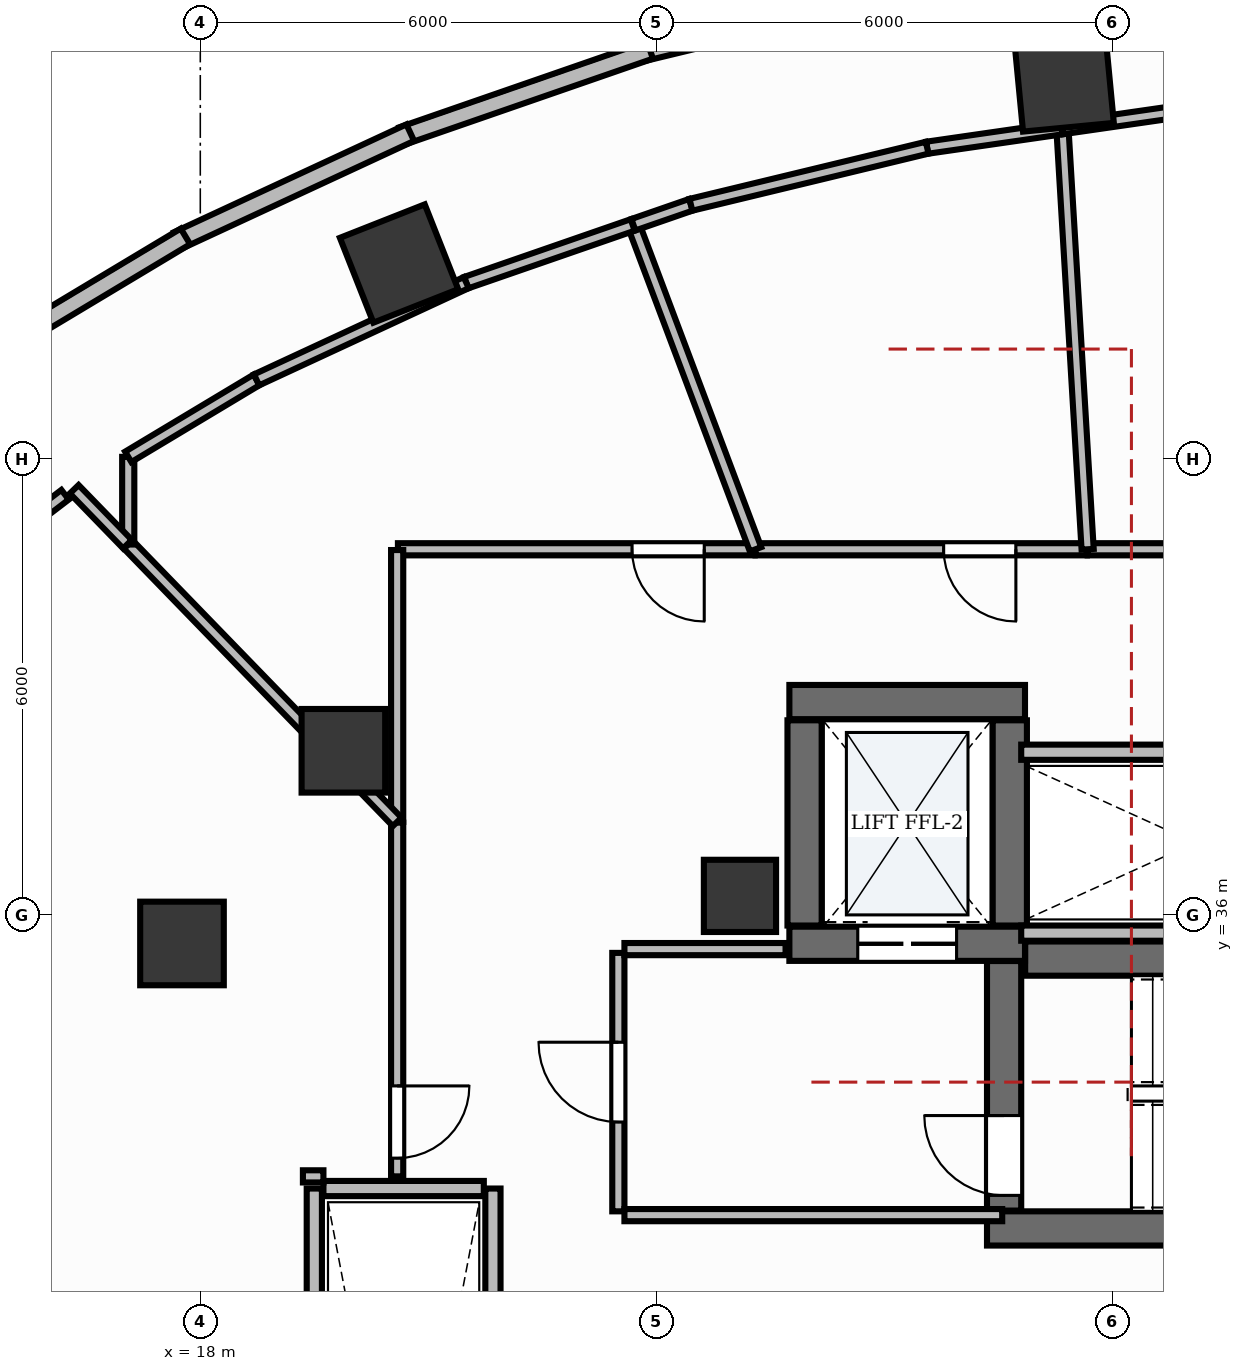
"""IFC4 building model, lengths in metres.
Left out: names, types, materials, properties, quantities, classifications, styles, units other than length and angle.
Written with IfcOpenShell. Run it as: python <this file> out.ifc"""

import sys

from ifc_helpers import new_model, si_unit, direction, frame, frame_2d, origin, origin_2d, place, context, subcontext, project, spatial, rectangle, extrude, element, fill, save


model = new_model("IFC4")
c1 = context("Model", 3, precision=1e-05, world=origin(), true_north=direction((0.0, 1.0)))
c2 = subcontext(c1, "Body", "Model", "MODEL_VIEW")
j1 = project(units=[si_unit("LENGTHUNIT", "METRE"), si_unit("PLANEANGLEUNIT", "RADIAN")], contexts=[c1])
p1 = place(None, origin())
s1 = spatial("IfcSite", under=j1, at=p1, CompositionType="ELEMENT")
p2 = place(p1, origin())
s2 = spatial("IfcBuilding", under=s1, at=p2, CompositionType="ELEMENT")
p3 = place(p2, frame((0.0, 0.0, 84.6)))
s3 = spatial("IfcBuildingStorey", under=s2, at=p3, CompositionType="ELEMENT", Elevation=84.6)
p4 = place(p3, frame((28.852, 35.425, 0.0), z_axis=(0.0, 0.0, 1.0), x_axis=(1.0, 0.0, 0.0)))
e1 = element("IfcWall", 1, at=p4, inside=s3, PredefinedType="SHEAR", context=c2, shape_type="SweptSolid", body=[
    extrude(rectangle(XDim=8.248, YDim=0.45, at=frame_2d((4.124, 0.0))), origin(), (0.0, 0.0, 1.0), 5.1),
])
p5 = place(p3, frame((28.35, 31.875, 0.0), z_axis=(0.0, 0.0, 1.0), x_axis=(1.0, 0.0, 0.0)))
e2 = element("IfcWall", 2, at=p5, inside=s3, PredefinedType="SHEAR", context=c2, shape_type="SweptSolid", body=[
    extrude(rectangle(XDim=8.75, YDim=0.45, at=frame_2d((4.375, 0.0))), origin(), (0.0, 0.0, 1.0), 5.1),
])
p6 = place(p3, frame((28.575, 32.11, 0.0), z_axis=(0.0, 0.0, 1.0), x_axis=(0.0, 1.0, 0.0)))
e3 = element("IfcWall", 3, at=p6, inside=s3, PredefinedType="SHEAR", context=c2, shape_type="SweptSolid", body=[
    extrude(rectangle(XDim=3.283, YDim=0.45, at=frame_2d((1.642, 0.0))), origin(), (0.0, 0.0, 1.0), 5.1),
])
p7 = place(p6, frame((0.2, 0.0, 0.0)))
e4 = element("IfcOpeningElement", 4, at=p7, cuts=e3, PredefinedType="OPENING", context=c2, shape_type="SweptSolid", body=[
    extrude(rectangle(XDim=1.05, YDim=2.15, at=frame_2d((0.525, 1.075))), frame((0.0, 0.24, 0.0), z_axis=(0.0, -1.0, 0.0), x_axis=(1.0, 0.0, 0.0)), (0.0, 0.0, 1.0), 0.48),
])
p8 = place(p3, frame((25.75, 38.8, 0.0), z_axis=(0.0, 0.0, 1.0), x_axis=(1.0, 0.0, 0.0)))
e5 = element("IfcWall", 5, at=p8, inside=s3, PredefinedType="SHEAR", context=c2, shape_type="SweptSolid", body=[
    extrude(rectangle(XDim=3.1, YDim=0.45, at=frame_2d((1.55, 0.0))), origin(), (0.0, 0.0, 1.0), 5.1),
])
p9 = place(p3, frame((25.75, 35.62, 0.0), z_axis=(0.0, 0.0, 1.0), x_axis=(1.0, 0.0, 0.0)))
e6 = element("IfcWall", 6, at=p9, inside=s3, PredefinedType="SHEAR", context=c2, shape_type="SweptSolid", body=[
    extrude(rectangle(XDim=3.1, YDim=0.45, at=frame_2d((1.55, 0.0))), origin(), (0.0, 0.0, 1.0), 5.1),
])
p10 = place(p9, frame((0.9, 0.0, 0.0)))
e7 = element("IfcOpeningElement", 7, at=p10, cuts=e6, PredefinedType="OPENING", context=c2, shape_type="SweptSolid", body=[
    extrude(rectangle(XDim=1.3, YDim=2.2, at=frame_2d((0.65, 1.1))), frame((0.0, 0.24, 0.0), z_axis=(0.0, -1.0, 0.0), x_axis=(1.0, 0.0, 0.0)), (0.0, 0.0, 1.0), 0.48),
])
for number, where, z_axis, x_axis in (
    (8, (25.95, 35.86, 0.0), (0.0, 0.0, 1.0), (0.0, 1.0, 0.0)),
    (9, (28.65, 35.86, 0.0), (0.0, 0.0, 1.0), (0.0, 1.0, 0.0)),
):
    element("IfcWall", number, at=place(p3, frame(where, z_axis=z_axis, x_axis=x_axis)), inside=s3, PredefinedType="SHEAR", context=c2, shape_type="SweptSolid", body=[
        extrude(rectangle(XDim=2.7, YDim=0.45, at=frame_2d((1.35, 0.0))), origin(), (0.0, 0.0, 1.0), 5.1),
    ])
p11 = place(p3, frame((25.1, 36.25, -0.0), z_axis=(0.0, 0.0, 1.0), x_axis=(1.0, 0.0, 0.0)))
e10 = element("IfcColumn", 10, at=p11, inside=s3, PredefinedType="PILASTER", context=c2, shape_type="SweptSolid", body=[
    extrude(rectangle(XDim=0.95, YDim=0.95, at=origin_2d()), origin(), (0.0, 0.0, 1.0), 5.101),
])
for number, where, z_axis, x_axis in (
    (11, (29.364, 46.959, -0.0), (0.0, 0.0, 1.0), (0.995, 0.095, 0.0)),
    (12, (20.615, 44.569, -0.0), (0.0, 0.0, 1.0), (0.93, 0.367, 0.0)),
):
    element("IfcColumn", number, at=place(p3, frame(where, z_axis=z_axis, x_axis=x_axis)), inside=s3, PredefinedType="COLUMN", context=c2, shape_type="SweptSolid", body=[
        extrude(rectangle(XDim=1.2, YDim=1.2, at=origin_2d()), origin(), (0.0, 0.0, 1.0), 5.101),
    ])
for number, where, z_axis, x_axis in (
    (13, (19.883, 38.159, -0.0), (0.0, 0.0, 1.0), (1.0, 0.0, 0.0)),
    (14, (17.759, 35.624, -0.0), (0.0, 0.0, 1.0), (1.0, 0.0, 0.0)),
):
    element("IfcColumn", number, at=place(p3, frame(where, z_axis=z_axis, x_axis=x_axis)), inside=s3, PredefinedType="COLUMN", context=c2, shape_type="SweptSolid", body=[
        extrude(rectangle(XDim=1.1, YDim=1.1, at=origin_2d()), origin(), (0.0, 0.0, 1.0), 5.101),
    ])
p12 = place(p3, frame((27.219, 48.17, 0.0), z_axis=(0.0, 0.0, 1.0), x_axis=(-0.972031834852, -0.23484912611, 0.0)))
e15 = element("IfcWall", 15, at=p12, inside=s3, PredefinedType="STANDARD", context=c2, shape_type="SweptSolid", body=[
    extrude(rectangle(XDim=3.509, YDim=0.24, at=frame_2d((1.754, 0.0))), origin(), (0.0, 0.0, 1.0), 5.1),
])
p13 = place(p3, frame((23.916, 47.378, 0.0), z_axis=(0.0, 0.0, 1.0), x_axis=(-0.944863079672, -0.327465663349, 0.0)))
e16 = element("IfcWall", 16, at=p13, inside=s3, PredefinedType="STANDARD", context=c2, shape_type="SweptSolid", body=[
    extrude(rectangle(XDim=3.448, YDim=0.24, at=frame_2d((1.724, 0.0))), origin(), (0.0, 0.0, 1.0), 5.1),
])
p14 = place(p3, frame((20.762, 46.291, 0.0), z_axis=(0.0, 0.0, 1.0), x_axis=(-0.907209471649, -0.420679182454, 0.0)))
e17 = element("IfcWall", 17, at=p14, inside=s3, PredefinedType="STANDARD", context=c2, shape_type="SweptSolid", body=[
    extrude(rectangle(XDim=3.37, YDim=0.24, at=frame_2d((1.685, 0.0))), origin(), (0.0, 0.0, 1.0), 4.67),
])
p15 = place(p3, frame((17.804, 44.926, 0.0), z_axis=(0.0, 0.0, 1.0), x_axis=(-0.857617674496, -0.51428778363, 0.0)))
e18 = element("IfcWall", 18, at=p15, inside=s3, PredefinedType="STANDARD", context=c2, shape_type="SweptSolid", body=[
    extrude(rectangle(XDim=3.28, YDim=0.24, at=frame_2d((1.64, 0.0))), origin(), (0.0, 0.0, 1.0), 5.1),
])
for number, where, z_axis, x_axis in (
    (19, (19.5, 21.6, 0.0), (0.0, 0.0, 1.0), (0.0, 1.0, 0.0)),
    (20, (21.85, 21.6, 0.0), (0.0, 0.0, 1.0), (0.0, 1.0, 0.0)),
):
    element("IfcWall", number, at=place(p3, frame(where, z_axis=z_axis, x_axis=x_axis)), inside=s3, PredefinedType="PARTITIONING", context=c2, shape_type="SweptSolid", body=[
        extrude(rectangle(XDim=10.8, YDim=0.2, at=frame_2d((5.4, 0.0))), origin(), (0.0, 0.0, 1.0), 3.96),
    ])
p16 = place(p3, frame((19.62, 32.4, 0.0), z_axis=(0.0, 0.0, 1.0), x_axis=(1.0, 0.0, 0.0)))
e21 = element("IfcWall", 21, at=p16, inside=s3, PredefinedType="PARTITIONING", context=c2, shape_type="SweptSolid", body=[
    extrude(rectangle(XDim=2.11, YDim=0.2, at=frame_2d((1.055, 0.0))), origin(), (0.0, 0.0, 1.0), 3.96),
])
for number, where, z_axis, x_axis in (
    (22, (28.8, 35.76, 0.0), (0.0, 0.0, 1.0), (1.0, 0.0, 0.0)),
    (23, (28.8, 38.14, 0.0), (0.0, 0.0, 1.0), (1.0, 0.0, 0.0)),
):
    element("IfcWall", number, at=place(p3, frame(where, z_axis=z_axis, x_axis=x_axis)), inside=s3, PredefinedType="PARTITIONING", context=c2, shape_type="SweptSolid", body=[
        extrude(rectangle(XDim=4.57, YDim=0.2, at=frame_2d((2.285, 0.0))), origin(), (0.0, 0.0, 1.0), 3.96),
    ])
p17 = place(p3, frame((23.5, 32.1, 0.0), z_axis=(0.0, 0.0, 1.0), x_axis=(0.0, 1.0, 0.0)))
e24 = element("IfcWall", 24, at=p17, inside=s3, PredefinedType="PARTITIONING", context=c2, shape_type="SweptSolid", body=[
    extrude(rectangle(XDim=3.4, YDim=0.16, at=frame_2d((1.7, 0.0))), origin(), (0.0, 0.0, 1.0), 3.96),
])
p18 = place(p17, frame((1.175, 0.0, 0.0)))
e25 = element("IfcOpeningElement", 25, at=p18, cuts=e24, PredefinedType="OPENING", context=c2, shape_type="SweptSolid", body=[
    extrude(rectangle(XDim=1.05, YDim=2.15, at=frame_2d((0.525, 1.075))), frame((0.0, 0.095, 0.0), z_axis=(0.0, -1.0, 0.0), x_axis=(1.0, 0.0, 0.0)), (0.0, 0.0, 1.0), 0.19),
])
p19 = place(p3, frame((23.58, 32.05, 0.0), z_axis=(0.0, 0.0, 1.0), x_axis=(1.0, 0.0, 0.0)))
e26 = element("IfcWall", 26, at=p19, inside=s3, PredefinedType="PARTITIONING", context=c2, shape_type="SweptSolid", body=[
    extrude(rectangle(XDim=4.97, YDim=0.16, at=frame_2d((2.485, 0.0))), origin(), (0.0, 0.0, 1.0), 3.96),
])
p20 = place(p3, frame((23.58, 35.55, 0.0), z_axis=(0.0, 0.0, 1.0), x_axis=(1.0, 0.0, 0.0)))
e27 = element("IfcWall", 27, at=p20, inside=s3, PredefinedType="PARTITIONING", context=c2, shape_type="SweptSolid", body=[
    extrude(rectangle(XDim=2.12, YDim=0.16, at=frame_2d((1.06, 0.0))), origin(), (0.0, 0.0, 1.0), 3.96),
])
p21 = place(p3, frame((37.0, 40.81, 0.0), z_axis=(0.0, 0.0, 1.0), x_axis=(-1.0, 0.0, 0.0)))
e28 = element("IfcWall", 28, at=p21, inside=s3, PredefinedType="PARTITIONING", context=c2, shape_type="SweptSolid", body=[
    extrude(rectangle(XDim=7.326, YDim=0.16, at=frame_2d((3.663, 0.0))), origin(), (0.0, 0.0, 1.0), 3.96),
])
p22 = place(p21, frame((3.57, 0.0, 0.0)))
e29 = element("IfcOpeningElement", 29, at=p22, cuts=e28, PredefinedType="OPENING", context=c2, shape_type="SweptSolid", body=[
    extrude(rectangle(XDim=0.95, YDim=2.15, at=frame_2d((0.475, 1.075))), frame((0.0, 0.095, 0.0), z_axis=(0.0, -1.0, 0.0), x_axis=(1.0, 0.0, 0.0)), (0.0, 0.0, 1.0), 0.19),
])
p23 = place(p3, frame((29.664, 40.81, 0.0), z_axis=(0.0, 0.0, 1.0), x_axis=(-1.0, 0.0, 0.0)))
e30 = element("IfcWall", 30, at=p23, inside=s3, PredefinedType="PARTITIONING", context=c2, shape_type="SweptSolid", body=[
    extrude(rectangle(XDim=4.359, YDim=0.16, at=frame_2d((2.18, 0.0))), origin(), (0.0, 0.0, 1.0), 3.96),
])
p24 = place(p23, frame((0.934, 0.0, 0.0)))
e31 = element("IfcOpeningElement", 31, at=p24, cuts=e30, PredefinedType="OPENING", context=c2, shape_type="SweptSolid", body=[
    extrude(rectangle(XDim=0.95, YDim=2.15, at=frame_2d((0.475, 1.075))), frame((0.0, 0.095, 0.0), z_axis=(0.0, -1.0, 0.0), x_axis=(1.0, 0.0, 0.0)), (0.0, 0.0, 1.0), 0.19),
])
p25 = place(p3, frame((25.294, 40.81, 0.0), z_axis=(0.0, 0.0, 1.0), x_axis=(-1.0, 0.0, 0.0)))
e32 = element("IfcWall", 32, at=p25, inside=s3, PredefinedType="PARTITIONING", context=c2, shape_type="SweptSolid", body=[
    extrude(rectangle(XDim=4.694, YDim=0.16, at=frame_2d((2.347, 0.0))), origin(), (0.0, 0.0, 1.0), 3.96),
])
p26 = place(p25, frame((0.664, 0.0, 0.0)))
e33 = element("IfcOpeningElement", 33, at=p26, cuts=e32, PredefinedType="OPENING", context=c2, shape_type="SweptSolid", body=[
    extrude(rectangle(XDim=0.95, YDim=2.15, at=frame_2d((0.475, 1.075))), frame((0.0, 0.095, 0.0), z_axis=(0.0, -1.0, 0.0), x_axis=(1.0, 0.0, 0.0)), (0.0, 0.0, 1.0), 0.19),
])
p27 = place(p3, frame((20.59, 37.214, 0.0), z_axis=(0.0, 0.0, 1.0), x_axis=(0.0, -1.0, 0.0)))
e34 = element("IfcWall", 34, at=p27, inside=s3, PredefinedType="PARTITIONING", context=c2, shape_type="SweptSolid", body=[
    extrude(rectangle(XDim=4.654, YDim=0.16, at=frame_2d((2.327, 0.0))), origin(), (0.0, 0.0, 1.0), 3.96),
])
p28 = place(p27, frame((3.464, 0.0, 0.0)))
e35 = element("IfcOpeningElement", 35, at=p28, cuts=e34, PredefinedType="OPENING", context=c2, shape_type="SweptSolid", body=[
    extrude(rectangle(XDim=0.95, YDim=2.15, at=frame_2d((0.475, 1.075))), frame((0.0, 0.095, 0.0), z_axis=(0.0, -1.0, 0.0), x_axis=(1.0, 0.0, 0.0)), (0.0, 0.0, 1.0), 0.19),
])
p29 = place(p3, frame((29.674, 40.81, 0.0), z_axis=(0.0, 0.0, 1.0), x_axis=(-0.059828293561, 0.998208683237, 0.0)))
e36 = element("IfcWall", 36, at=p29, inside=s3, PredefinedType="PARTITIONING", context=c2, shape_type="SweptSolid", body=[
    extrude(rectangle(XDim=5.55, YDim=0.16, at=frame_2d((2.775, 0.0))), origin(), (0.0, 0.0, 1.0), 3.96),
])
p30 = place(p3, frame((29.342, 46.35, 0.0), z_axis=(0.0, 0.0, 1.0), x_axis=(0.98973922772, 0.142885482509, 0.0)))
e37 = element("IfcWall", 37, at=p30, inside=s3, PredefinedType="PARTITIONING", context=c2, shape_type="SweptSolid", body=[
    extrude(rectangle(XDim=1.447, YDim=0.16, at=frame_2d((0.724, 0.0))), origin(), (0.0, 0.0, 1.0), 3.96),
])
p31 = place(p3, frame((27.562, 46.093, 0.0), z_axis=(0.0, 0.0, 1.0), x_axis=(0.989746382277, 0.142835915544, 0.0)))
e38 = element("IfcWall", 38, at=p31, inside=s3, PredefinedType="PARTITIONING", context=c2, shape_type="SweptSolid", body=[
    extrude(rectangle(XDim=1.788, YDim=0.16, at=frame_2d((0.894, 0.0))), origin(), (0.0, 0.0, 1.0), 3.96),
])
p32 = place(p3, frame((25.305, 40.81, 0.0), z_axis=(0.0, 0.0, 1.0), x_axis=(-0.352231602854, 0.935912868781, 0.0)))
e39 = element("IfcWall", 39, at=p32, inside=s3, PredefinedType="PARTITIONING", context=c2, shape_type="SweptSolid", body=[
    extrude(rectangle(XDim=4.562, YDim=0.16, at=frame_2d((2.281, 0.0))), origin(), (0.0, 0.0, 1.0), 3.96),
])
p33 = place(p3, frame((23.698, 45.08, 0.0), z_axis=(0.0, 0.0, 1.0), x_axis=(0.944804754022, 0.327633906637, 0.0)))
e40 = element("IfcWall", 40, at=p33, inside=s3, PredefinedType="PARTITIONING", context=c2, shape_type="SweptSolid", body=[
    extrude(rectangle(XDim=0.801, YDim=0.16, at=frame_2d((0.4, 0.0))), origin(), (0.0, 0.0, 1.0), 3.96),
])
p34 = place(p3, frame((24.455, 45.342, 0.0), z_axis=(0.0, 0.0, 1.0), x_axis=(0.972038947661, 0.234819684504, 0.0)))
e41 = element("IfcWall", 41, at=p34, inside=s3, PredefinedType="PARTITIONING", context=c2, shape_type="SweptSolid", body=[
    extrude(rectangle(XDim=3.197, YDim=0.16, at=frame_2d((1.599, 0.0))), origin(), (0.0, 0.0, 1.0), 3.96),
])
p35 = place(p3, frame((21.499, 44.318, 0.0), z_axis=(0.0, 0.0, 1.0), x_axis=(0.944877053464, 0.327425340859, 0.0)))
e42 = element("IfcWall", 42, at=p35, inside=s3, PredefinedType="PARTITIONING", context=c2, shape_type="SweptSolid", body=[
    extrude(rectangle(XDim=2.317, YDim=0.16, at=frame_2d((1.159, 0.0))), origin(), (0.0, 0.0, 1.0), 3.96),
])
p36 = place(p3, frame((20.59, 40.8, 0.0), z_axis=(0.0, 0.0, 1.0), x_axis=(0.0, -1.0, 0.0)))
e43 = element("IfcWall", 43, at=p36, inside=s3, PredefinedType="PARTITIONING", context=c2, shape_type="SweptSolid", body=[
    extrude(rectangle(XDim=3.576, YDim=0.16, at=frame_2d((1.788, 0.0))), origin(), (0.0, 0.0, 1.0), 3.96),
])
p37 = place(p3, frame((20.59, 37.224, 0.0), z_axis=(0.0, 0.0, 1.0), x_axis=(-0.696094823364, 0.717949856805, 0.0)))
e44 = element("IfcWall", 44, at=p37, inside=s3, PredefinedType="PARTITIONING", context=c2, shape_type="SweptSolid", body=[
    extrude(rectangle(XDim=5.083, YDim=0.16, at=frame_2d((2.542, 0.0))), origin(), (0.0, 0.0, 1.0), 3.96),
])
p38 = place(p3, frame((17.052, 40.873, 0.0), z_axis=(0.0, 0.0, 1.0), x_axis=(0.0, 1.0, 0.0)))
e45 = element("IfcWall", 45, at=p38, inside=s3, PredefinedType="PARTITIONING", context=c2, shape_type="SweptSolid", body=[
    extrude(rectangle(XDim=1.153, YDim=0.16, at=frame_2d((0.577, 0.0))), origin(), (0.0, 0.0, 1.0), 3.96),
])
p39 = place(p3, frame((17.052, 42.026, 0.0), z_axis=(0.0, 0.0, 1.0), x_axis=(0.857525745267, 0.514441052214, 0.0)))
e46 = element("IfcWall", 46, at=p39, inside=s3, PredefinedType="PARTITIONING", context=c2, shape_type="SweptSolid", body=[
    extrude(rectangle(XDim=1.969, YDim=0.16, at=frame_2d((0.984, 0.0))), origin(), (0.0, 0.0, 1.0), 3.96),
])
p40 = place(p3, frame((18.74, 43.039, 0.0), z_axis=(0.0, 0.0, 1.0), x_axis=(0.907222430233, 0.420651235684, 0.0)))
e47 = element("IfcWall", 47, at=p40, inside=s3, PredefinedType="PARTITIONING", context=c2, shape_type="SweptSolid", body=[
    extrude(rectangle(XDim=3.041, YDim=0.16, at=frame_2d((1.52, 0.0))), origin(), (0.0, 0.0, 1.0), 3.96),
])
p41 = place(p3, frame((13.977, 39.812, 0.0), z_axis=(0.0, 0.0, 1.0), x_axis=(0.794468240787, 0.607305700928, 0.0)))
e48 = element("IfcWall", 48, at=p41, inside=s3, PredefinedType="PARTITIONING", context=c2, shape_type="SweptSolid", body=[
    extrude(rectangle(XDim=2.824, YDim=0.16, at=frame_2d((1.412, 0.0))), origin(), (0.0, 0.0, 1.0), 3.96),
])
p42 = place(p3, frame((16.342, 41.6, 0.0), z_axis=(0.0, 0.0, 1.0), x_axis=(0.696104152684, -0.71794081136, 0.0)))
e49 = element("IfcWall", 49, at=p42, inside=s3, PredefinedType="PARTITIONING", context=c2, shape_type="SweptSolid", body=[
    extrude(rectangle(XDim=1.006, YDim=0.16, at=frame_2d((0.503, 0.0))), origin(), (0.0, 0.0, 1.0), 3.96),
])
p43 = place(p3, frame((19.62, 32.56, 0.0), z_axis=(0.0, 0.0, 1.0), x_axis=(-1.0, 0.0, 0.0)))
e50 = element("IfcWall", 50, at=p43, inside=s3, PredefinedType="PARTITIONING", context=c2, shape_type="SweptSolid", body=[
    extrude(rectangle(XDim=0.27, YDim=0.16, at=frame_2d((0.135, 0.0))), origin(), (0.0, 0.0, 1.0), 3.96),
])
p44 = place(p7, origin())
e51 = element("IfcDoor", 51, at=p44, inside=s3, OperationType="SINGLE_SWING_RIGHT", PredefinedType="DOOR", context=c2, shape_type="SweptSolid", body=[
    extrude(rectangle(XDim=1.05, YDim=2.15, at=frame_2d((0.525, 1.075))), frame((0.0, 0.025, 0.0), z_axis=(0.0, -1.0, 0.0), x_axis=(1.0, 0.0, 0.0)), (0.0, 0.0, 1.0), 0.05),
])
fill(e4, e51)
p45 = place(p10, origin())
e52 = element("IfcDoor", 52, at=p45, inside=s3, OperationType="DOUBLE_DOOR_SLIDING", PredefinedType="DOOR", context=c2, shape_type="SweptSolid", body=[
    extrude(rectangle(XDim=1.3, YDim=2.2, at=frame_2d((0.65, 1.1))), frame((0.0, 0.025, 0.0), z_axis=(0.0, -1.0, 0.0), x_axis=(1.0, 0.0, 0.0)), (0.0, 0.0, 1.0), 0.05),
])
fill(e7, e52)
p46 = place(p18, origin())
e53 = element("IfcDoor", 53, at=p46, inside=s3, OperationType="SINGLE_SWING_RIGHT", PredefinedType="DOOR", context=c2, shape_type="SweptSolid", body=[
    extrude(rectangle(XDim=1.05, YDim=2.15, at=frame_2d((0.525, 1.075))), frame((0.0, 0.025, 0.0), z_axis=(0.0, -1.0, 0.0), x_axis=(1.0, 0.0, 0.0)), (0.0, 0.0, 1.0), 0.05),
])
fill(e25, e53)
p47 = place(p24, origin())
e54 = element("IfcDoor", 54, at=p47, inside=s3, OperationType="SINGLE_SWING_LEFT", PredefinedType="DOOR", context=c2, shape_type="SweptSolid", body=[
    extrude(rectangle(XDim=0.95, YDim=2.15, at=frame_2d((0.475, 1.075))), frame((0.0, 0.025, 0.0), z_axis=(0.0, -1.0, 0.0), x_axis=(1.0, 0.0, 0.0)), (0.0, 0.0, 1.0), 0.05),
])
fill(e31, e54)
p48 = place(p26, origin())
e55 = element("IfcDoor", 55, at=p48, inside=s3, OperationType="SINGLE_SWING_LEFT", PredefinedType="DOOR", context=c2, shape_type="SweptSolid", body=[
    extrude(rectangle(XDim=0.95, YDim=2.15, at=frame_2d((0.475, 1.075))), frame((0.0, 0.025, 0.0), z_axis=(0.0, -1.0, 0.0), x_axis=(1.0, 0.0, 0.0)), (0.0, 0.0, 1.0), 0.05),
])
fill(e33, e55)
p49 = place(p28, origin())
e56 = element("IfcDoor", 56, at=p49, inside=s3, OperationType="SINGLE_SWING_LEFT", PredefinedType="DOOR", context=c2, shape_type="SweptSolid", body=[
    extrude(rectangle(XDim=0.95, YDim=2.15, at=frame_2d((0.475, 1.075))), frame((0.0, 0.025, 0.0), z_axis=(0.0, -1.0, 0.0), x_axis=(1.0, 0.0, 0.0)), (0.0, 0.0, 1.0), 0.05),
])
fill(e35, e56)
save(model, sys.argv[1])
